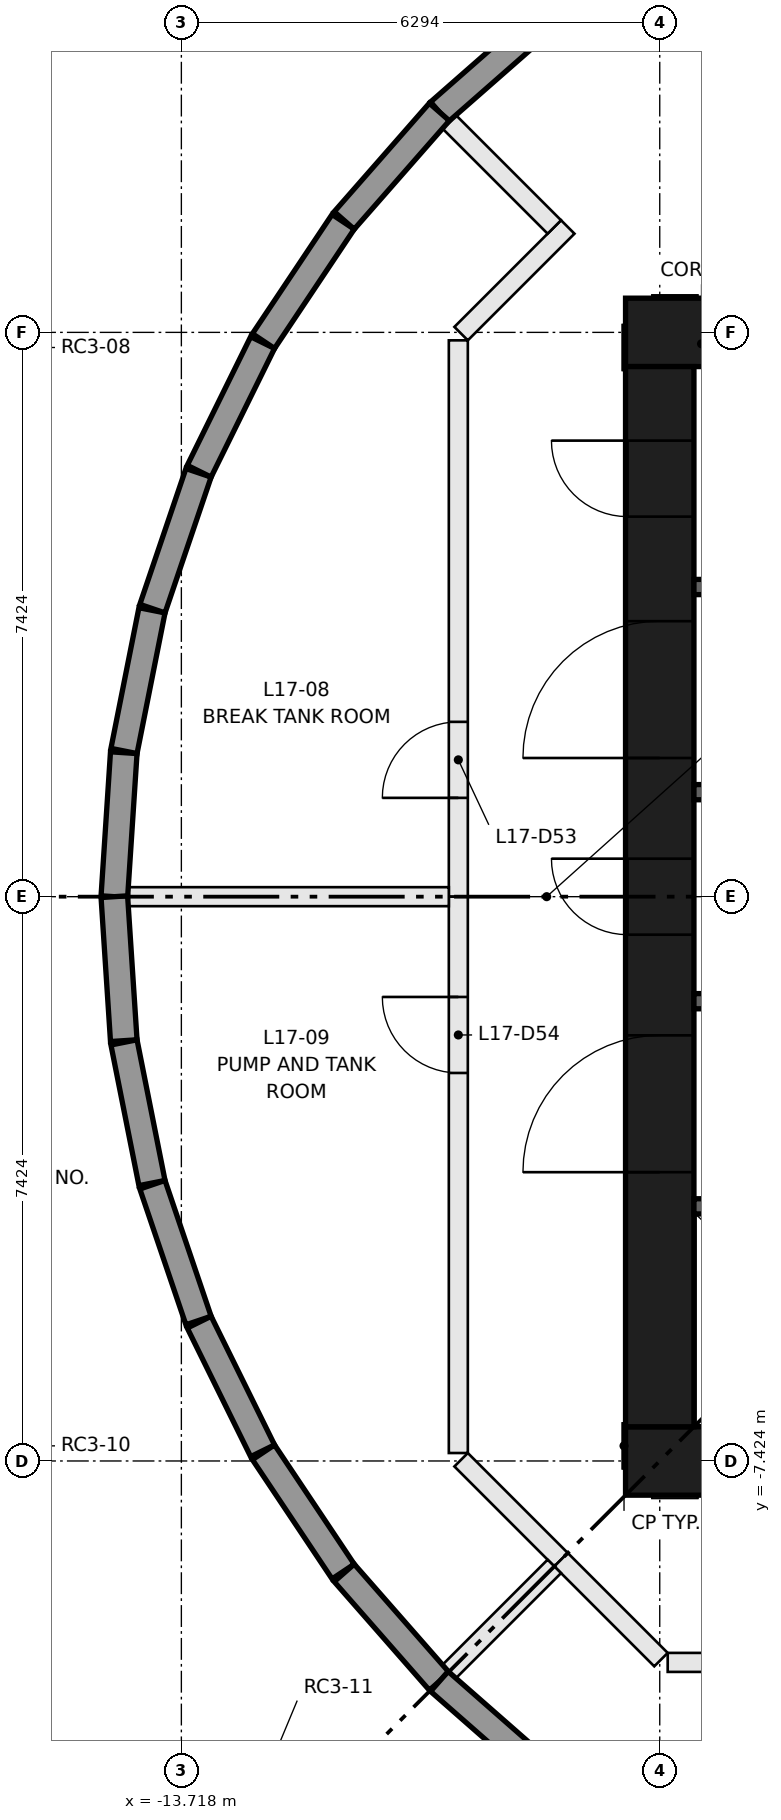
"""IFC4 building model, lengths in metres.
Left out: names, types, materials, properties, quantities, classifications, styles, units other than length and angle.
Written with IfcOpenShell. Run it as: python <this file> out.ifc"""

import sys

from ifc_helpers import new_model, si_unit, direction, frame, frame_2d, origin, place, context, subcontext, project, spatial, rectangle, extrude, element, fill, save


model = new_model("IFC4")
c1 = context("Model", 3, precision=1e-05, world=origin(), true_north=direction((0.0, 1.0)))
c2 = subcontext(c1, "Body", "Model", "MODEL_VIEW")
j1 = project(units=[si_unit("LENGTHUNIT", "METRE"), si_unit("PLANEANGLEUNIT", "RADIAN")], contexts=[c1])
p1 = place(None, origin())
s1 = spatial("IfcSite", under=j1, at=p1, CompositionType="ELEMENT")
p2 = place(p1, origin())
s2 = spatial("IfcBuilding", under=s1, at=p2, CompositionType="ELEMENT")
p3 = place(p2, frame((0.0, 0.0, 66.35)))
s3 = spatial("IfcBuildingStorey", under=s2, at=p3, CompositionType="ELEMENT", Elevation=66.35)
for number, where, z_axis, x_axis in (
    (1, (-7.874, -7.424, 0.0), (0.0, 0.0, 1.0), (1.0, 0.0, 0.0)),
    (2, (-7.874, 7.424, 0.0), (0.0, 0.0, 1.0), (1.0, 0.0, 0.0)),
):
    element("IfcWall", number, at=place(p3, frame(where, z_axis=z_axis, x_axis=x_axis)), inside=s3, PredefinedType="SHEAR", context=c2, shape_type="SweptSolid", body=[
        extrude(rectangle(XDim=15.748, YDim=0.9, at=frame_2d((7.874, 0.0))), origin(), (0.0, 0.0, 1.0), 6.4),
    ])
p4 = place(p3, frame((-7.424, -6.974, 0.0), z_axis=(0.0, 0.0, 1.0), x_axis=(0.0, 1.0, 0.0)))
e3 = element("IfcWall", 3, at=p4, inside=s3, PredefinedType="SHEAR", context=c2, shape_type="SweptSolid", body=[
    extrude(rectangle(XDim=13.948, YDim=0.9, at=frame_2d((6.974, 0.0))), origin(), (0.0, 0.0, 1.0), 6.4),
])
p5 = place(p4, frame((6.474, 0.0, 0.0)))
e4 = element("IfcOpeningElement", 4, at=p5, cuts=e3, PredefinedType="OPENING", context=c2, shape_type="SweptSolid", body=[
    extrude(rectangle(XDim=1.0, YDim=2.1, at=frame_2d((0.5, 1.05))), frame((0.0, 0.46, 0.0), z_axis=(0.0, -1.0, 0.0), x_axis=(1.0, 0.0, 0.0)), (0.0, 0.0, 1.0), 0.92),
])
p6 = place(p4, frame((3.35, 0.0, 0.0)))
e5 = element("IfcOpeningElement", 5, at=p6, cuts=e3, PredefinedType="OPENING", context=c2, shape_type="SweptSolid", body=[
    extrude(rectangle(XDim=1.8, YDim=2.1, at=frame_2d((0.9, 1.05))), frame((0.0, 0.46, 0.0), z_axis=(0.0, -1.0, 0.0), x_axis=(1.0, 0.0, 0.0)), (0.0, 0.0, 1.0), 0.92),
])
p7 = place(p4, frame((8.799, 0.0, 0.0)))
e6 = element("IfcOpeningElement", 6, at=p7, cuts=e3, PredefinedType="OPENING", context=c2, shape_type="SweptSolid", body=[
    extrude(rectangle(XDim=1.8, YDim=2.1, at=frame_2d((0.9, 1.05))), frame((0.0, 0.46, 0.0), z_axis=(0.0, -1.0, 0.0), x_axis=(1.0, 0.0, 0.0)), (0.0, 0.0, 1.0), 0.92),
])
p8 = place(p4, frame((11.974, 0.0, 0.0)))
e7 = element("IfcOpeningElement", 7, at=p8, cuts=e3, PredefinedType="OPENING", context=c2, shape_type="SweptSolid", body=[
    extrude(rectangle(XDim=1.0, YDim=2.1, at=frame_2d((0.5, 1.05))), frame((0.0, 0.46, 0.0), z_axis=(0.0, -1.0, 0.0), x_axis=(1.0, 0.0, 0.0)), (0.0, 0.0, 1.0), 0.92),
])
p9 = place(p3, frame((-6.974, -4.074, 0.0), z_axis=(0.0, 0.0, 1.0), x_axis=(1.0, 0.0, 0.0)))
e8 = element("IfcWall", 8, at=p9, inside=s3, PredefinedType="SHEAR", context=c2, shape_type="SweptSolid", body=[
    extrude(rectangle(XDim=13.948, YDim=0.2, at=frame_2d((6.974, 0.0))), origin(), (0.0, 0.0, 1.0), 6.05),
])
p10 = place(p9, frame((0.918, 0.0, 0.0)))
e9 = element("IfcOpeningElement", 9, at=p10, cuts=e8, PredefinedType="OPENING", context=c2, shape_type="SweptSolid", body=[
    extrude(rectangle(XDim=1.1, YDim=2.1, at=frame_2d((0.55, 1.05))), frame((0.0, 0.11, 0.0), z_axis=(0.0, -1.0, 0.0), x_axis=(1.0, 0.0, 0.0)), (0.0, 0.0, 1.0), 0.22),
])
p11 = place(p9, frame((4.055, 0.0, 0.0)))
e10 = element("IfcOpeningElement", 10, at=p11, cuts=e8, PredefinedType="OPENING", context=c2, shape_type="SweptSolid", body=[
    extrude(rectangle(XDim=1.1, YDim=2.1, at=frame_2d((0.55, 1.05))), frame((0.0, 0.11, 0.0), z_axis=(0.0, -1.0, 0.0), x_axis=(1.0, 0.0, 0.0)), (0.0, 0.0, 1.0), 0.22),
])
p12 = place(p9, frame((6.658, 0.0, 0.0)))
e11 = element("IfcOpeningElement", 11, at=p12, cuts=e8, PredefinedType="OPENING", context=c2, shape_type="SweptSolid", body=[
    extrude(rectangle(XDim=1.0, YDim=2.1, at=frame_2d((0.5, 1.05))), frame((0.0, 0.11, 0.0), z_axis=(0.0, -1.0, 0.0), x_axis=(1.0, 0.0, 0.0)), (0.0, 0.0, 1.0), 0.22),
])
p13 = place(p9, frame((8.627, 0.0, 0.0)))
e12 = element("IfcOpeningElement", 12, at=p13, cuts=e8, PredefinedType="OPENING", context=c2, shape_type="SweptSolid", body=[
    extrude(rectangle(XDim=1.0, YDim=2.1, at=frame_2d((0.5, 1.05))), frame((0.0, 0.11, 0.0), z_axis=(0.0, -1.0, 0.0), x_axis=(1.0, 0.0, 0.0)), (0.0, 0.0, 1.0), 0.22),
])
p14 = place(p9, frame((10.595, 0.0, 0.0)))
e13 = element("IfcOpeningElement", 13, at=p14, cuts=e8, PredefinedType="OPENING", context=c2, shape_type="SweptSolid", body=[
    extrude(rectangle(XDim=1.0, YDim=2.1, at=frame_2d((0.5, 1.05))), frame((0.0, 0.11, 0.0), z_axis=(0.0, -1.0, 0.0), x_axis=(1.0, 0.0, 0.0)), (0.0, 0.0, 1.0), 0.22),
])
p15 = place(p9, frame((12.564, 0.0, 0.0)))
e14 = element("IfcOpeningElement", 14, at=p15, cuts=e8, PredefinedType="OPENING", context=c2, shape_type="SweptSolid", body=[
    extrude(rectangle(XDim=1.0, YDim=2.1, at=frame_2d((0.5, 1.05))), frame((0.0, 0.11, 0.0), z_axis=(0.0, -1.0, 0.0), x_axis=(1.0, 0.0, 0.0)), (0.0, 0.0, 1.0), 0.22),
])
p16 = place(p3, frame((-6.974, 4.074, 0.0), z_axis=(0.0, 0.0, 1.0), x_axis=(1.0, 0.0, 0.0)))
e15 = element("IfcWall", 15, at=p16, inside=s3, PredefinedType="SHEAR", context=c2, shape_type="SweptSolid", body=[
    extrude(rectangle(XDim=6.974, YDim=0.2, at=frame_2d((3.487, 0.0))), origin(), (0.0, 0.0, 1.0), 6.05),
])
for number, where, z_axis, x_axis in (
    (16, (-6.974, -1.375, 0.0), (0.0, 0.0, 1.0), (1.0, 0.0, 0.0)),
    (17, (-6.974, 1.375, 0.0), (0.0, 0.0, 1.0), (1.0, 0.0, 0.0)),
):
    element("IfcWall", number, at=place(p3, frame(where, z_axis=z_axis, x_axis=x_axis)), inside=s3, PredefinedType="SHEAR", context=c2, shape_type="SweptSolid", body=[
        extrude(rectangle(XDim=2.6, YDim=0.2, at=frame_2d((1.3, 0.0))), origin(), (0.0, 0.0, 1.0), 6.05),
    ])
p17 = place(p3, frame((-10.074, 0.0, 0.0), z_axis=(0.0, 0.0, 1.0), x_axis=(0.0, 1.0, 0.0)))
e18 = element("IfcWall", 18, at=p17, inside=s3, PredefinedType="PARTITIONING", context=c2, shape_type="SweptSolid", body=[
    extrude(rectangle(XDim=7.319, YDim=0.25, at=frame_2d((3.66, 0.0))), origin(), (0.0, 0.0, 1.0), 6.05),
])
p18 = place(p17, frame((1.3, 0.0, 0.0)))
e19 = element("IfcOpeningElement", 19, at=p18, cuts=e18, PredefinedType="OPENING", context=c2, shape_type="SweptSolid", body=[
    extrude(rectangle(XDim=1.0, YDim=2.1, at=frame_2d((0.5, 1.05))), frame((0.0, 0.135, 0.0), z_axis=(0.0, -1.0, 0.0), x_axis=(1.0, 0.0, 0.0)), (0.0, 0.0, 1.0), 0.27),
])
p19 = place(p3, frame((-10.037, 7.408, 0.0), z_axis=(0.0, 0.0, 1.0), x_axis=(0.707168292802, 0.70704526422, 0.0)))
e20 = element("IfcWall", 20, at=p19, inside=s3, PredefinedType="PARTITIONING", context=c2, shape_type="SweptSolid", body=[
    extrude(rectangle(XDim=1.984, YDim=0.25, at=frame_2d((0.992, 0.0))), origin(), (0.0, 0.0, 1.0), 6.05),
])
p20 = place(p3, frame((-10.074, -7.319, 0.0), z_axis=(0.0, 0.0, 1.0), x_axis=(0.0, 1.0, 0.0)))
e21 = element("IfcWall", 21, at=p20, inside=s3, PredefinedType="PARTITIONING", context=c2, shape_type="SweptSolid", body=[
    extrude(rectangle(XDim=7.319, YDim=0.25, at=frame_2d((3.66, 0.0))), origin(), (0.0, 0.0, 1.0), 6.05),
])
p21 = place(p20, frame((5.0, 0.0, 0.0)))
e22 = element("IfcOpeningElement", 22, at=p21, cuts=e21, PredefinedType="OPENING", context=c2, shape_type="SweptSolid", body=[
    extrude(rectangle(XDim=1.0, YDim=2.1, at=frame_2d((0.5, 1.05))), frame((0.0, 0.135, 0.0), z_axis=(0.0, -1.0, 0.0), x_axis=(1.0, 0.0, 0.0)), (0.0, 0.0, 1.0), 0.27),
])
for number, where, z_axis, x_axis in (
    (23, (-8.722, -8.722, 0.0), (0.0, 0.0, 1.0), (-0.707, 0.707, 0.0)),
    (24, (-7.408, -10.037, 0.0), (0.0, 0.0, 1.0), (-0.707, 0.707, 0.0)),
):
    element("IfcWall", number, at=place(p3, frame(where, z_axis=z_axis, x_axis=x_axis)), inside=s3, PredefinedType="PARTITIONING", context=c2, shape_type="SweptSolid", body=[
        extrude(rectangle(XDim=1.859, YDim=0.25, at=frame_2d((0.93, 0.0))), origin(), (0.0, 0.0, 1.0), 6.05),
    ])
p22 = place(p3, frame((0.125, -10.074, 0.0), z_axis=(0.0, 0.0, 1.0), x_axis=(-1.0, 0.0, 0.0)))
e25 = element("IfcWall", 25, at=p22, inside=s3, PredefinedType="PARTITIONING", context=c2, shape_type="SweptSolid", body=[
    extrude(rectangle(XDim=7.444, YDim=0.25, at=frame_2d((3.722, 0.0))), origin(), (0.0, 0.0, 1.0), 6.05),
])
p23 = place(p22, frame((1.5, 0.0, 0.0)))
e26 = element("IfcOpeningElement", 26, at=p23, cuts=e25, PredefinedType="OPENING", context=c2, shape_type="SweptSolid", body=[
    extrude(rectangle(XDim=1.0, YDim=2.1, at=frame_2d((0.5, 1.05))), frame((0.0, 0.135, 0.0), z_axis=(0.0, -1.0, 0.0), x_axis=(1.0, 0.0, 0.0)), (0.0, 0.0, 1.0), 0.27),
])
p24 = place(p3, frame((-10.324, 10.324, 0.0), z_axis=(0.0, 0.0, 1.0), x_axis=(0.751827337506, 0.659360034108, 0.0)))
e27 = element("IfcWall", 27, at=p24, inside=s3, PredefinedType="PARTITIONING", context=c2, shape_type="SweptSolid", body=[
    extrude(rectangle(XDim=1.898, YDim=0.35, at=frame_2d((0.949, 0.0))), origin(), (0.0, 0.0, 1.0), 6.05),
])
p25 = place(p3, frame((-8.811, 8.811, 0.0), z_axis=(0.0, 0.0, 1.0), x_axis=(-0.707106781187, 0.707106781187, 0.0)))
e28 = element("IfcWall", 28, at=p25, inside=s3, PredefinedType="PARTITIONING", context=c2, shape_type="SweptSolid", body=[
    extrude(rectangle(XDim=1.956, YDim=0.25, at=frame_2d((0.978, 0.0))), origin(), (0.0, 0.0, 1.0), 6.05),
])
p26 = place(p3, frame((-14.6, 0.0, 0.0), z_axis=(0.0, 0.0, 1.0), x_axis=(0.065460533058, 0.997855159135, 0.0)))
e29 = element("IfcWall", 29, at=p26, inside=s3, PredefinedType="PARTITIONING", context=c2, shape_type="SweptSolid", body=[
    extrude(rectangle(XDim=1.898, YDim=0.35, at=frame_2d((0.949, 0.0))), origin(), (0.0, 0.0, 1.0), 6.05),
])
p27 = place(p3, frame((-14.473, 1.917, 0.0), z_axis=(0.0, 0.0, 1.0), x_axis=(0.195120723342, 0.980779232714, 0.0)))
e30 = element("IfcWall", 30, at=p27, inside=s3, PredefinedType="PARTITIONING", context=c2, shape_type="SweptSolid", body=[
    extrude(rectangle(XDim=1.887, YDim=0.35, at=frame_2d((0.943, 0.0))), origin(), (0.0, 0.0, 1.0), 6.05),
])
for number, where, z_axis, x_axis in (
    (31, (-14.099, 3.79, 0.0), (0.0, 0.0, 1.0), (0.322, 0.947, 0.0)),
    (32, (-13.483, 5.597, 0.0), (0.0, 0.0, 1.0), (0.442, 0.897, 0.0)),
):
    element("IfcWall", number, at=place(p3, frame(where, z_axis=z_axis, x_axis=x_axis)), inside=s3, PredefinedType="PARTITIONING", context=c2, shape_type="SweptSolid", body=[
        extrude(rectangle(XDim=1.887, YDim=0.35, at=frame_2d((0.943, 0.0))), origin(), (0.0, 0.0, 1.0), 6.05),
    ])
p28 = place(p3, frame((-12.638, 7.31, 0.0), z_axis=(0.0, 0.0, 1.0), x_axis=(0.555595643605, 0.831452632931, 0.0)))
e33 = element("IfcWall", 33, at=p28, inside=s3, PredefinedType="PARTITIONING", context=c2, shape_type="SweptSolid", body=[
    extrude(rectangle(XDim=1.887, YDim=0.35, at=frame_2d((0.943, 0.0))), origin(), (0.0, 0.0, 1.0), 6.05),
])
p29 = place(p3, frame((-11.575, 8.896, 0.0), z_axis=(0.0, 0.0, 1.0), x_axis=(0.659360034108, 0.751827337506, 0.0)))
e34 = element("IfcWall", 34, at=p29, inside=s3, PredefinedType="PARTITIONING", context=c2, shape_type="SweptSolid", body=[
    extrude(rectangle(XDim=1.898, YDim=0.35, at=frame_2d((0.949, 0.0))), origin(), (0.0, 0.0, 1.0), 6.05),
])
p30 = place(p3, frame((-10.199, 0.0, 0.0), z_axis=(0.0, 0.0, 1.0), x_axis=(-1.0, 0.0, 0.0)))
e35 = element("IfcWall", 35, at=p30, inside=s3, PredefinedType="PARTITIONING", context=c2, shape_type="SweptSolid", body=[
    extrude(rectangle(XDim=4.218, YDim=0.25, at=frame_2d((2.109, 0.0))), origin(), (0.0, 0.0, 1.0), 6.05),
])
p31 = place(p3, frame((-14.476, -1.894, 0.0), z_axis=(0.0, 0.0, 1.0), x_axis=(-0.065460533058, 0.997855159135, 0.0)))
e36 = element("IfcWall", 36, at=p31, inside=s3, PredefinedType="PARTITIONING", context=c2, shape_type="SweptSolid", body=[
    extrude(rectangle(XDim=1.898, YDim=0.35, at=frame_2d((0.949, 0.0))), origin(), (0.0, 0.0, 1.0), 6.05),
])
p32 = place(p3, frame((-14.105, -3.768, 0.0), z_axis=(0.0, 0.0, 1.0), x_axis=(-0.195120723342, 0.980779232714, 0.0)))
e37 = element("IfcWall", 37, at=p32, inside=s3, PredefinedType="PARTITIONING", context=c2, shape_type="SweptSolid", body=[
    extrude(rectangle(XDim=1.887, YDim=0.35, at=frame_2d((0.943, 0.0))), origin(), (0.0, 0.0, 1.0), 6.05),
])
for number, where, z_axis, x_axis in (
    (38, (-13.492, -5.576, 0.0), (0.0, 0.0, 1.0), (-0.322, 0.947, 0.0)),
    (39, (-12.649, -7.29, 0.0), (0.0, 0.0, 1.0), (-0.442, 0.897, 0.0)),
):
    element("IfcWall", number, at=place(p3, frame(where, z_axis=z_axis, x_axis=x_axis)), inside=s3, PredefinedType="PARTITIONING", context=c2, shape_type="SweptSolid", body=[
        extrude(rectangle(XDim=1.887, YDim=0.35, at=frame_2d((0.943, 0.0))), origin(), (0.0, 0.0, 1.0), 6.05),
    ])
p33 = place(p3, frame((-11.589, -8.878, 0.0), z_axis=(0.0, 0.0, 1.0), x_axis=(-0.555595643605, 0.831452632931, 0.0)))
e40 = element("IfcWall", 40, at=p33, inside=s3, PredefinedType="PARTITIONING", context=c2, shape_type="SweptSolid", body=[
    extrude(rectangle(XDim=1.887, YDim=0.35, at=frame_2d((0.943, 0.0))), origin(), (0.0, 0.0, 1.0), 6.05),
])
p34 = place(p3, frame((-10.324, -10.324, 0.0), z_axis=(0.0, 0.0, 1.0), x_axis=(-0.659360034108, 0.751827337506, 0.0)))
e41 = element("IfcWall", 41, at=p34, inside=s3, PredefinedType="PARTITIONING", context=c2, shape_type="SweptSolid", body=[
    extrude(rectangle(XDim=1.898, YDim=0.35, at=frame_2d((0.949, 0.0))), origin(), (0.0, 0.0, 1.0), 6.05),
])
p35 = place(p3, frame((-8.811, -8.811, 0.0), z_axis=(0.0, 0.0, 1.0), x_axis=(-0.707106781187, -0.707106781187, 0.0)))
e42 = element("IfcWall", 42, at=p35, inside=s3, PredefinedType="PARTITIONING", context=c2, shape_type="SweptSolid", body=[
    extrude(rectangle(XDim=1.956, YDim=0.25, at=frame_2d((0.978, 0.0))), origin(), (0.0, 0.0, 1.0), 6.05),
])
p36 = place(p3, frame((-8.896, -11.575, 0.0), z_axis=(0.0, 0.0, 1.0), x_axis=(-0.751827337506, 0.659360034108, 0.0)))
e43 = element("IfcWall", 43, at=p36, inside=s3, PredefinedType="PARTITIONING", context=c2, shape_type="SweptSolid", body=[
    extrude(rectangle(XDim=1.898, YDim=0.35, at=frame_2d((0.949, 0.0))), origin(), (0.0, 0.0, 1.0), 6.05),
])
p37 = place(p5, origin())
e44 = element("IfcDoor", 44, at=p37, inside=s3, OperationType="SINGLE_SWING_RIGHT", PredefinedType="DOOR", context=c2, shape_type="SweptSolid", body=[
    extrude(rectangle(XDim=1.0, YDim=2.1, at=frame_2d((0.5, 1.05))), frame((0.0, 0.45, 0.0), z_axis=(0.0, -1.0, 0.0), x_axis=(1.0, 0.0, 0.0)), (0.0, 0.0, 1.0), 0.05),
])
fill(e4, e44)
p38 = place(p6, origin())
e45 = element("IfcDoor", 45, at=p38, inside=s3, OperationType="DOUBLE_DOOR_SINGLE_SWING", PredefinedType="DOOR", context=c2, shape_type="SweptSolid", body=[
    extrude(rectangle(XDim=1.8, YDim=2.1, at=frame_2d((0.9, 1.05))), frame((0.0, 0.025, 0.0), z_axis=(0.0, -1.0, 0.0), x_axis=(1.0, 0.0, 0.0)), (0.0, 0.0, 1.0), 0.05),
])
fill(e5, e45)
p39 = place(p7, origin())
e46 = element("IfcDoor", 46, at=p39, inside=s3, OperationType="DOUBLE_DOOR_SINGLE_SWING", PredefinedType="DOOR", context=c2, shape_type="SweptSolid", body=[
    extrude(rectangle(XDim=1.8, YDim=2.1, at=frame_2d((0.9, 1.05))), frame((0.0, 0.025, 0.0), z_axis=(0.0, -1.0, 0.0), x_axis=(1.0, 0.0, 0.0)), (0.0, 0.0, 1.0), 0.05),
])
fill(e6, e46)
p40 = place(p8, origin())
e47 = element("IfcDoor", 47, at=p40, inside=s3, OperationType="SINGLE_SWING_RIGHT", PredefinedType="DOOR", context=c2, shape_type="SweptSolid", body=[
    extrude(rectangle(XDim=1.0, YDim=2.1, at=frame_2d((0.5, 1.05))), frame((0.0, 0.45, 0.0), z_axis=(0.0, -1.0, 0.0), x_axis=(1.0, 0.0, 0.0)), (0.0, 0.0, 1.0), 0.05),
])
fill(e7, e47)
p41 = place(p18, origin())
e48 = element("IfcDoor", 48, at=p41, inside=s3, OperationType="SINGLE_SWING_LEFT", PredefinedType="DOOR", context=c2, shape_type="SweptSolid", body=[
    extrude(rectangle(XDim=1.0, YDim=2.1, at=frame_2d((0.5, 1.05))), frame((0.0, 0.025, 0.0), z_axis=(0.0, -1.0, 0.0), x_axis=(1.0, 0.0, 0.0)), (0.0, 0.0, 1.0), 0.05),
])
fill(e19, e48)
p42 = place(p21, origin())
e49 = element("IfcDoor", 49, at=p42, inside=s3, OperationType="SINGLE_SWING_RIGHT", PredefinedType="DOOR", context=c2, shape_type="SweptSolid", body=[
    extrude(rectangle(XDim=1.0, YDim=2.1, at=frame_2d((0.5, 1.05))), frame((0.0, 0.025, 0.0), z_axis=(0.0, -1.0, 0.0), x_axis=(1.0, 0.0, 0.0)), (0.0, 0.0, 1.0), 0.05),
])
fill(e22, e49)
save(model, sys.argv[1])
